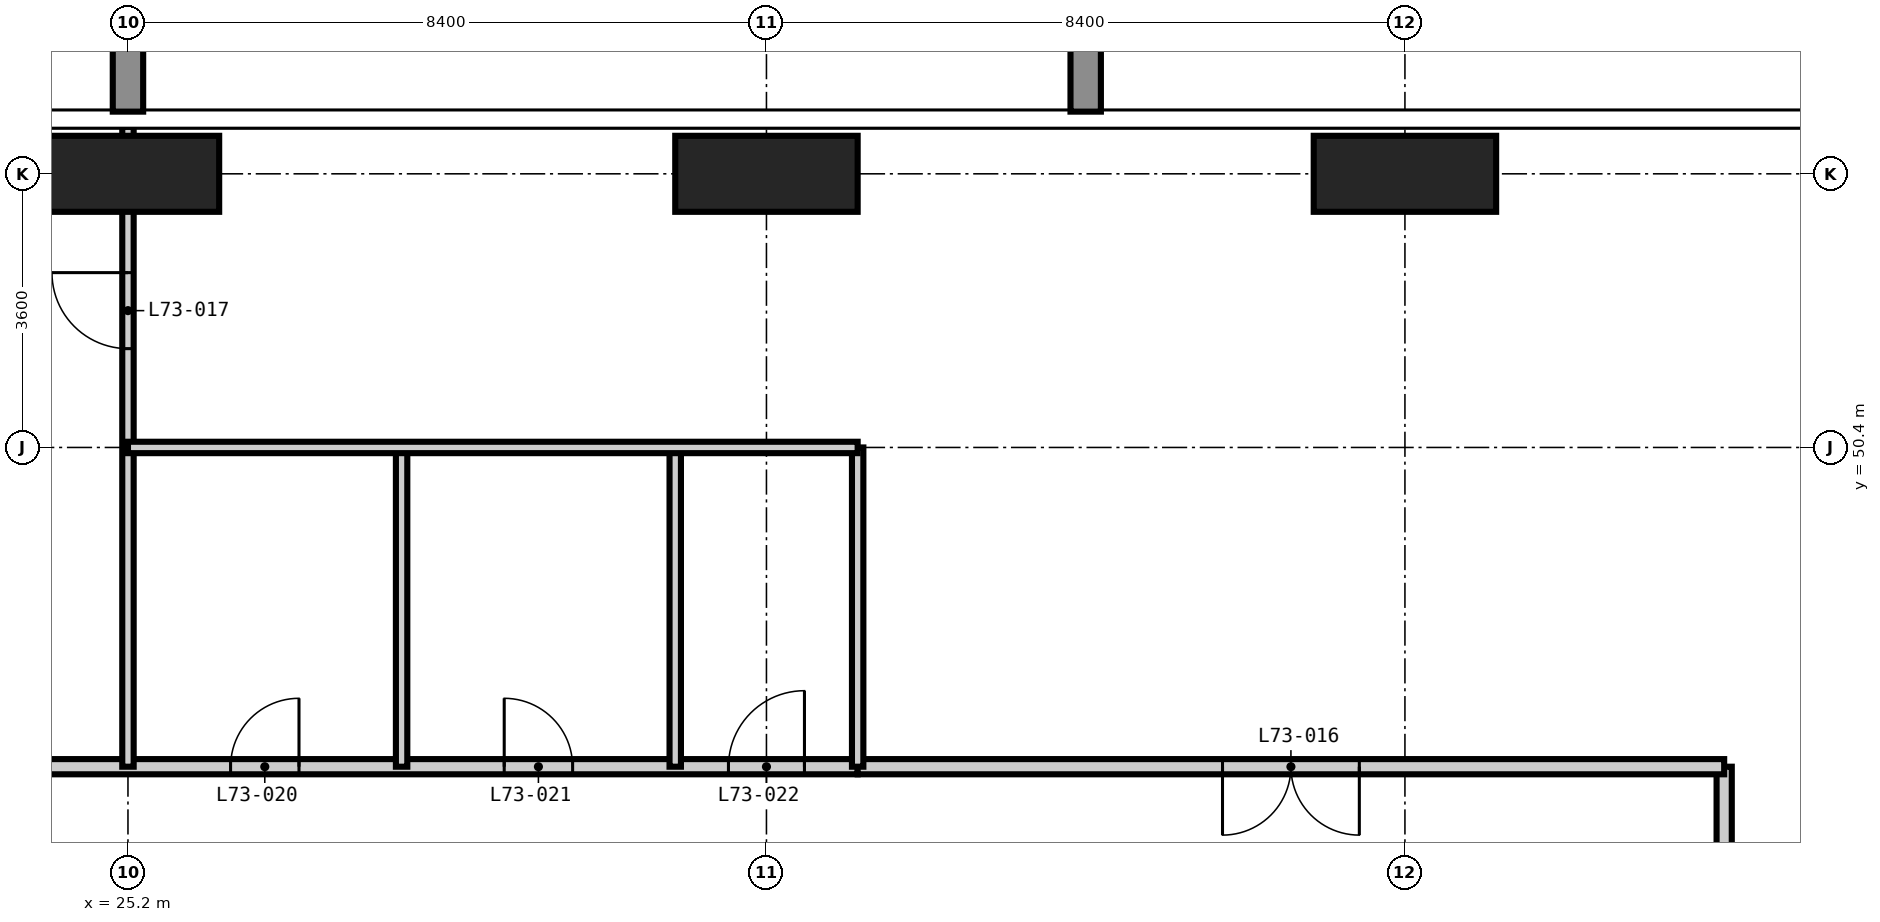
"""IFC4 building model, lengths in metres.
Left out: names, types, materials, properties, quantities, classifications, styles, units other than length and angle.
Written with IfcOpenShell. Run it as: python <this file> out.ifc"""

import sys

from ifc_helpers import new_model, si_unit, direction, frame, frame_2d, origin, origin_2d, place, context, subcontext, project, spatial, rectangle, extrude, element, fill, save


model = new_model("IFC4")
c1 = context("Model", 3, precision=1e-05, world=origin(), true_north=direction((0.0, 1.0)))
c2 = subcontext(c1, "Body", "Model", "MODEL_VIEW")
j1 = project(units=[si_unit("LENGTHUNIT", "METRE"), si_unit("PLANEANGLEUNIT", "RADIAN")], contexts=[c1])
p1 = place(None, origin())
s1 = spatial("IfcSite", under=j1, at=p1, CompositionType="ELEMENT")
p2 = place(p1, origin())
s2 = spatial("IfcBuilding", under=s1, at=p2, CompositionType="ELEMENT")
p3 = place(p2, frame((0.0, 0.0, 284.1)))
s3 = spatial("IfcBuildingStorey", under=s2, at=p3, CompositionType="ELEMENT", Elevation=284.1)
for number, where, z_axis, x_axis in (
    (1, (25.2, 54.0, -0.35), (0.0, 0.0, 1.0), (1.0, 0.0, 0.0)),
    (2, (33.6, 54.0, -0.35), (0.0, 0.0, 1.0), (1.0, 0.0, 0.0)),
    (3, (42.0, 54.0, -0.35), (0.0, 0.0, 1.0), (1.0, 0.0, 0.0)),
):
    element("IfcColumn", number, at=place(p3, frame(where, z_axis=z_axis, x_axis=x_axis)), inside=s3, PredefinedType="COLUMN", context=c2, shape_type="SweptSolid", body=[
        extrude(rectangle(XDim=2.4, YDim=1.0, at=origin_2d()), origin(), (0.0, 0.0, 1.0), 5.0),
    ])
p4 = place(p3, frame((46.2, 33.6, 0.0), z_axis=(0.0, 0.0, 1.0), x_axis=(0.0, 1.0, 0.0)))
e4 = element("IfcWall", 4, at=p4, inside=s3, PredefinedType="PARTITIONING", context=c2, shape_type="SweptSolid", body=[
    extrude(rectangle(XDim=12.6, YDim=0.2, at=frame_2d((6.3, 0.0))), origin(), (0.0, 0.0, 1.0), 4.65),
])
p5 = place(p4, frame((5.4, 0.0, 0.0)))
e5 = element("IfcOpeningElement", 5, at=p5, cuts=e4, PredefinedType="OPENING", context=c2, shape_type="SweptSolid", body=[
    extrude(rectangle(XDim=1.8, YDim=2.4, at=frame_2d((0.9, 1.2))), frame((0.0, 0.11, 0.0), z_axis=(0.0, -1.0, 0.0), x_axis=(1.0, 0.0, 0.0)), (0.0, 0.0, 1.0), 0.22),
])
p6 = place(p3, frame((21.0, 46.2, 0.0), z_axis=(0.0, 0.0, 1.0), x_axis=(1.0, 0.0, 0.0)))
e6 = element("IfcWall", 6, at=p6, inside=s3, PredefinedType="PARTITIONING", context=c2, shape_type="SweptSolid", body=[
    extrude(rectangle(XDim=13.8, YDim=0.2, at=frame_2d((6.9, 0.0))), origin(), (0.0, 0.0, 1.0), 4.65),
])
p7 = place(p6, frame((1.6, 0.0, 0.0)))
e7 = element("IfcOpeningElement", 7, at=p7, cuts=e6, PredefinedType="OPENING", context=c2, shape_type="SweptSolid", body=[
    extrude(rectangle(XDim=1.0, YDim=2.1, at=frame_2d((0.5, 1.05))), frame((0.0, 0.11, 0.0), z_axis=(0.0, -1.0, 0.0), x_axis=(1.0, 0.0, 0.0)), (0.0, 0.0, 1.0), 0.22),
])
p8 = place(p6, frame((5.55, 0.0, 0.0)))
e8 = element("IfcOpeningElement", 8, at=p8, cuts=e6, PredefinedType="OPENING", context=c2, shape_type="SweptSolid", body=[
    extrude(rectangle(XDim=0.9, YDim=2.1, at=frame_2d((0.45, 1.05))), frame((0.0, 0.11, 0.0), z_axis=(0.0, -1.0, 0.0), x_axis=(1.0, 0.0, 0.0)), (0.0, 0.0, 1.0), 0.22),
])
p9 = place(p6, frame((9.15, 0.0, 0.0)))
e9 = element("IfcOpeningElement", 9, at=p9, cuts=e6, PredefinedType="OPENING", context=c2, shape_type="SweptSolid", body=[
    extrude(rectangle(XDim=0.9, YDim=2.1, at=frame_2d((0.45, 1.05))), frame((0.0, 0.11, 0.0), z_axis=(0.0, -1.0, 0.0), x_axis=(1.0, 0.0, 0.0)), (0.0, 0.0, 1.0), 0.22),
])
p10 = place(p6, frame((12.1, 0.0, 0.0)))
e10 = element("IfcOpeningElement", 10, at=p10, cuts=e6, PredefinedType="OPENING", context=c2, shape_type="SweptSolid", body=[
    extrude(rectangle(XDim=1.0, YDim=2.1, at=frame_2d((0.5, 1.05))), frame((0.0, 0.11, 0.0), z_axis=(0.0, -1.0, 0.0), x_axis=(1.0, 0.0, 0.0)), (0.0, 0.0, 1.0), 0.22),
])
p11 = place(p3, frame((46.2, 46.2, 0.0), z_axis=(0.0, 0.0, 1.0), x_axis=(-1.0, 0.0, 0.0)))
e11 = element("IfcWall", 11, at=p11, inside=s3, PredefinedType="PARTITIONING", context=c2, shape_type="SweptSolid", body=[
    extrude(rectangle(XDim=11.4, YDim=0.2, at=frame_2d((5.7, 0.0))), origin(), (0.0, 0.0, 1.0), 4.65),
])
p12 = place(p11, frame((4.8, 0.0, 0.0)))
e12 = element("IfcOpeningElement", 12, at=p12, cuts=e11, PredefinedType="OPENING", context=c2, shape_type="SweptSolid", body=[
    extrude(rectangle(XDim=1.8, YDim=2.4, at=frame_2d((0.9, 1.2))), frame((0.0, 0.11, 0.0), z_axis=(0.0, -1.0, 0.0), x_axis=(1.0, 0.0, 0.0)), (0.0, 0.0, 1.0), 0.22),
])
p13 = place(p3, frame((25.2, 46.2, 0.0), z_axis=(0.0, 0.0, 1.0), x_axis=(0.0, 1.0, 0.0)))
e13 = element("IfcWall", 13, at=p13, inside=s3, PredefinedType="PARTITIONING", context=c2, shape_type="SweptSolid", body=[
    extrude(rectangle(XDim=8.418, YDim=0.15, at=frame_2d((4.209, 0.0))), origin(), (0.0, 0.0, 1.0), 4.65),
])
p14 = place(p13, frame((5.5, 0.0, 0.0)))
e14 = element("IfcOpeningElement", 14, at=p14, cuts=e13, PredefinedType="OPENING", context=c2, shape_type="SweptSolid", body=[
    extrude(rectangle(XDim=1.0, YDim=2.1, at=frame_2d((0.5, 1.05))), frame((0.0, 0.085, 0.0), z_axis=(0.0, -1.0, 0.0), x_axis=(1.0, 0.0, 0.0)), (0.0, 0.0, 1.0), 0.17),
])
for number, where, z_axis, x_axis in (
    (15, (28.8, 46.2, 0.0), (0.0, 0.0, 1.0), (0.0, 1.0, 0.0)),
    (16, (32.4, 46.2, 0.0), (0.0, 0.0, 1.0), (0.0, 1.0, 0.0)),
    (17, (34.8, 46.2, 0.0), (0.0, 0.0, 1.0), (0.0, 1.0, 0.0)),
):
    element("IfcWall", number, at=place(p3, frame(where, z_axis=z_axis, x_axis=x_axis)), inside=s3, PredefinedType="PARTITIONING", context=c2, shape_type="SweptSolid", body=[
        extrude(rectangle(XDim=4.2, YDim=0.15, at=frame_2d((2.1, 0.0))), origin(), (0.0, 0.0, 1.0), 4.65),
    ])
p15 = place(p3, frame((25.2, 50.4, 0.0), z_axis=(0.0, 0.0, 1.0), x_axis=(1.0, 0.0, 0.0)))
e18 = element("IfcWall", 18, at=p15, inside=s3, PredefinedType="PARTITIONING", context=c2, shape_type="SweptSolid", body=[
    extrude(rectangle(XDim=9.6, YDim=0.15, at=frame_2d((4.8, 0.0))), origin(), (0.0, 0.0, 1.0), 4.65),
])
p16 = place(p12, origin())
e19 = element("IfcDoor", 19, at=p16, inside=s3, OperationType="DOUBLE_DOOR_DOUBLE_SWING", PredefinedType="DOOR", context=c2, shape_type="SweptSolid", body=[
    extrude(rectangle(XDim=1.8, YDim=2.4, at=frame_2d((0.9, 1.2))), frame((0.0, 0.025, 0.0), z_axis=(0.0, -1.0, 0.0), x_axis=(1.0, 0.0, 0.0)), (0.0, 0.0, 1.0), 0.05),
])
fill(e12, e19)
p17 = place(p14, origin())
e20 = element("IfcDoor", 20, at=p17, inside=s3, OperationType="SINGLE_SWING_RIGHT", PredefinedType="DOOR", context=c2, shape_type="SweptSolid", body=[
    extrude(rectangle(XDim=1.0, YDim=2.1, at=frame_2d((0.5, 1.05))), frame((0.0, 0.025, 0.0), z_axis=(0.0, -1.0, 0.0), x_axis=(1.0, 0.0, 0.0)), (0.0, 0.0, 1.0), 0.05),
])
fill(e14, e20)
p18 = place(p8, origin())
e21 = element("IfcDoor", 21, at=p18, inside=s3, OperationType="SINGLE_SWING_RIGHT", PredefinedType="DOOR", context=c2, shape_type="SweptSolid", body=[
    extrude(rectangle(XDim=0.9, YDim=2.1, at=frame_2d((0.45, 1.05))), frame((0.0, 0.025, 0.0), z_axis=(0.0, -1.0, 0.0), x_axis=(1.0, 0.0, 0.0)), (0.0, 0.0, 1.0), 0.05),
])
fill(e8, e21)
p19 = place(p9, origin())
e22 = element("IfcDoor", 22, at=p19, inside=s3, OperationType="SINGLE_SWING_LEFT", PredefinedType="DOOR", context=c2, shape_type="SweptSolid", body=[
    extrude(rectangle(XDim=0.9, YDim=2.1, at=frame_2d((0.45, 1.05))), frame((0.0, 0.025, 0.0), z_axis=(0.0, -1.0, 0.0), x_axis=(1.0, 0.0, 0.0)), (0.0, 0.0, 1.0), 0.05),
])
fill(e9, e22)
p20 = place(p10, origin())
e23 = element("IfcDoor", 23, at=p20, inside=s3, OperationType="SINGLE_SWING_RIGHT", PredefinedType="DOOR", context=c2, shape_type="SweptSolid", body=[
    extrude(rectangle(XDim=1.0, YDim=2.1, at=frame_2d((0.5, 1.05))), frame((0.0, 0.025, 0.0), z_axis=(0.0, -1.0, 0.0), x_axis=(1.0, 0.0, 0.0)), (0.0, 0.0, 1.0), 0.05),
])
fill(e10, e23)
save(model, sys.argv[1])
